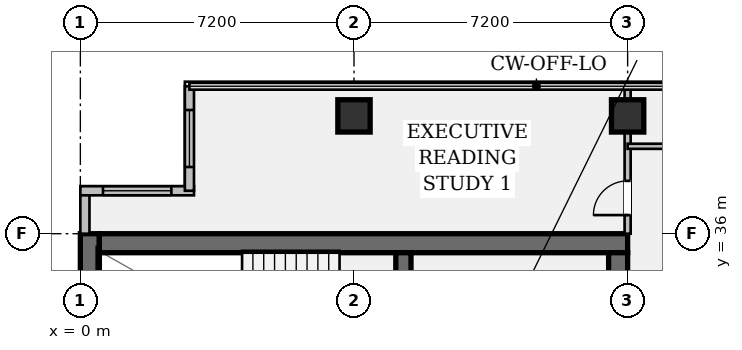
"""IFC4 building model, lengths in metres.
Left out: names, types, materials, properties, quantities, classifications, styles, units other than length and angle.
Written with IfcOpenShell. Run it as: python <this file> out.ifc"""

import sys

from ifc_helpers import new_model, si_unit, direction, frame, frame_2d, origin, origin_2d, place, context, subcontext, project, spatial, rectangle, hollow_rectangle, extrude, element, fill, save


model = new_model("IFC4")
c1 = context("Model", 3, precision=1e-05, world=origin(), true_north=direction((0.0, 1.0)))
c2 = subcontext(c1, "Body", "Model", "MODEL_VIEW")
j1 = project(units=[si_unit("LENGTHUNIT", "METRE"), si_unit("PLANEANGLEUNIT", "RADIAN")], contexts=[c1])
p1 = place(None, origin())
s1 = spatial("IfcSite", under=j1, at=p1, CompositionType="ELEMENT")
p2 = place(p1, origin())
s2 = spatial("IfcBuilding", under=s1, at=p2, CompositionType="ELEMENT")
p3 = place(p2, frame((0.0, 0.0, 183.75)))
s3 = spatial("IfcBuildingStorey", under=s2, at=p3, CompositionType="ELEMENT", Elevation=183.75)
p4 = place(p3, frame((0.25, 7.2, 0.0), z_axis=(0.0, 0.0, 1.0), x_axis=(0.0, 1.0, 0.0)))
e1 = element("IfcWall", 1, at=p4, inside=s3, PredefinedType="SHEAR", context=c2, shape_type="SweptSolid", body=[
    extrude(rectangle(XDim=28.8, YDim=0.5, at=frame_2d((14.4, 0.0))), origin(), (0.0, 0.0, 1.0), 3.24),
])
p5 = place(p3, frame((0.5, 35.75, 0.0), z_axis=(0.0, 0.0, 1.0), x_axis=(1.0, 0.0, 0.0)))
e2 = element("IfcWall", 2, at=p5, inside=s3, PredefinedType="SHEAR", context=c2, shape_type="SweptSolid", body=[
    extrude(rectangle(XDim=13.9, YDim=0.5, at=frame_2d((6.95, 0.0))), origin(), (0.0, 0.0, 1.0), 3.24),
])
p6 = place(p3, frame((14.15, 35.5, 0.0), z_axis=(0.0, 0.0, 1.0), x_axis=(0.0, -1.0, 0.0)))
e3 = element("IfcWall", 3, at=p6, inside=s3, PredefinedType="SHEAR", context=c2, shape_type="SweptSolid", body=[
    extrude(rectangle(XDim=27.8, YDim=0.5, at=frame_2d((13.9, 0.0))), origin(), (0.0, 0.0, 1.0), 3.24),
])
p7 = place(p6, frame((1.4, 0.0, 0.0)))
e4 = element("IfcOpeningElement", 4, at=p7, cuts=e3, PredefinedType="OPENING", context=c2, shape_type="SweptSolid", body=[
    extrude(rectangle(XDim=1.2, YDim=2.15, at=frame_2d((0.6, 1.075))), frame((0.0, 0.262, 0.0), z_axis=(0.0, -1.0, 0.0), x_axis=(1.0, 0.0, 0.0)), (0.0, 0.0, 1.0), 0.524),
])
p8 = place(p6, frame((25.35, 0.0, 0.0)))
e5 = element("IfcOpeningElement", 5, at=p8, cuts=e3, PredefinedType="OPENING", context=c2, shape_type="SweptSolid", body=[
    extrude(rectangle(XDim=1.2, YDim=2.15, at=frame_2d((0.6, 1.075))), frame((0.0, 0.262, 0.0), z_axis=(0.0, -1.0, 0.0), x_axis=(1.0, 0.0, 0.0)), (0.0, 0.0, 1.0), 0.524),
])
p9 = place(p6, frame((14.7, 0.0, 0.0)))
e6 = element("IfcOpeningElement", 6, at=p9, cuts=e3, PredefinedType="OPENING", context=c2, shape_type="SweptSolid", body=[
    extrude(rectangle(XDim=1.6, YDim=2.2, at=frame_2d((0.8, 1.1))), frame((0.0, 0.262, 0.0), z_axis=(0.0, -1.0, 0.0), x_axis=(1.0, 0.0, 0.0)), (0.0, 0.0, 1.0), 0.524),
])
p10 = place(p3, frame((8.5, 31.72, 0.0), z_axis=(0.0, 0.0, 1.0), x_axis=(0.0, 1.0, 0.0)))
e7 = element("IfcWall", 7, at=p10, inside=s3, PredefinedType="SHEAR", context=c2, shape_type="SweptSolid", body=[
    extrude(rectangle(XDim=3.78, YDim=0.4, at=frame_2d((1.89, 0.0))), origin(), (0.0, 0.0, 1.0), 3.24),
])
p11 = place(p10, frame((0.9, 0.0, 0.0)))
e8 = element("IfcOpeningElement", 8, at=p11, cuts=e7, PredefinedType="OPENING", context=c2, shape_type="SweptSolid", body=[
    extrude(rectangle(XDim=1.1, YDim=2.15, at=frame_2d((0.55, 1.075))), frame((0.0, 0.212, 0.0), z_axis=(0.0, -1.0, 0.0), x_axis=(1.0, 0.0, 0.0)), (0.0, 0.0, 1.0), 0.424),
])
for number, where, z_axis, x_axis in (
    (9, (7.2, 39.1, 0.0), (0.0, 0.0, 1.0), (1.0, 0.0, 0.0)),
    (10, (14.4, 39.1, 0.0), (0.0, 0.0, 1.0), (1.0, 0.0, 0.0)),
):
    element("IfcColumn", number, at=place(p3, frame(where, z_axis=z_axis, x_axis=x_axis)), inside=s3, PredefinedType="COLUMN", context=c2, shape_type="SweptSolid", body=[
        extrude(hollow_rectangle(XDim=0.85, YDim=0.85, WallThickness=0.05, at=origin_2d()), origin(), (0.0, 0.0, 1.0), 3.24),
    ])
p12 = place(p3, frame((0.12, 36.0, 0.0), z_axis=(0.0, 0.0, 1.0), x_axis=(0.0, 1.0, 0.0)))
e11 = element("IfcWall", 11, at=p12, inside=s3, PredefinedType="STANDARD", context=c2, shape_type="SweptSolid", body=[
    extrude(rectangle(XDim=1.13, YDim=0.24, at=frame_2d((0.565, 0.0))), origin(), (0.0, 0.0, 1.0), 3.24),
])
p13 = place(p3, frame((0.0, 37.13, 0.0), z_axis=(0.0, 0.0, 1.0), x_axis=(1.0, 0.0, 0.0)))
e12 = element("IfcWall", 12, at=p13, inside=s3, PredefinedType="STANDARD", context=c2, shape_type="SweptSolid", body=[
    extrude(rectangle(XDim=2.99, YDim=0.24, at=frame_2d((1.495, 0.0))), origin(), (0.0, 0.0, 1.0), 3.24),
])
p14 = place(p13, frame((0.595, 0.0, 0.95)))
e13 = element("IfcOpeningElement", 13, at=p14, cuts=e12, PredefinedType="OPENING", context=c2, shape_type="SweptSolid", body=[
    extrude(rectangle(XDim=1.8, YDim=1.35, at=frame_2d((0.9, 0.675))), frame((0.0, 0.132, 0.0), z_axis=(0.0, -1.0, 0.0), x_axis=(1.0, 0.0, 0.0)), (0.0, 0.0, 1.0), 0.264),
])
p15 = place(p3, frame((2.87, 37.13, 0.0), z_axis=(0.0, 0.0, 1.0), x_axis=(0.0, 1.0, 0.0)))
e14 = element("IfcWall", 14, at=p15, inside=s3, PredefinedType="STANDARD", context=c2, shape_type="SweptSolid", body=[
    extrude(rectangle(XDim=2.75, YDim=0.24, at=frame_2d((1.375, 0.0))), origin(), (0.0, 0.0, 1.0), 3.24),
])
p16 = place(p15, frame((0.625, 0.0, 0.95)))
e15 = element("IfcOpeningElement", 15, at=p16, cuts=e14, PredefinedType="OPENING", context=c2, shape_type="SweptSolid", body=[
    extrude(rectangle(XDim=1.5, YDim=1.8, at=frame_2d((0.75, 0.9))), frame((0.0, 0.132, 0.0), z_axis=(0.0, -1.0, 0.0), x_axis=(1.0, 0.0, 0.0)), (0.0, 0.0, 1.0), 0.264),
])
p17 = place(p3, frame((14.4, 36.0, 0.0), z_axis=(0.0, 0.0, 1.0), x_axis=(0.0, 1.0, 0.0)))
e16 = element("IfcWall", 16, at=p17, inside=s3, PredefinedType="PARTITIONING", context=c2, shape_type="SweptSolid", body=[
    extrude(rectangle(XDim=3.88, YDim=0.16, at=frame_2d((1.94, 0.0))), origin(), (0.0, 0.0, 1.0), 2.603),
])
p18 = place(p17, frame((0.49, 0.0, 0.0)))
e17 = element("IfcOpeningElement", 17, at=p18, cuts=e16, PredefinedType="OPENING", context=c2, shape_type="SweptSolid", body=[
    extrude(rectangle(XDim=0.9, YDim=2.15, at=frame_2d((0.45, 1.075))), frame((0.0, 0.092, 0.0), z_axis=(0.0, -1.0, 0.0), x_axis=(1.0, 0.0, 0.0)), (0.0, 0.0, 1.0), 0.184),
])
p19 = place(p3, frame((14.4, 38.3, 0.0), z_axis=(0.0, 0.0, 1.0), x_axis=(1.0, 0.0, 0.0)))
e18 = element("IfcWall", 18, at=p19, inside=s3, PredefinedType="PARTITIONING", context=c2, shape_type="SweptSolid", body=[
    extrude(rectangle(XDim=2.95, YDim=0.135, at=frame_2d((1.475, 0.0))), origin(), (0.0, 0.0, 1.0), 3.24),
])
p20 = place(p19, frame((1.7, 0.0, 0.0)))
e19 = element("IfcOpeningElement", 19, at=p20, cuts=e18, PredefinedType="OPENING", context=c2, shape_type="SweptSolid", body=[
    extrude(rectangle(XDim=0.88, YDim=2.15, at=frame_2d((0.44, 1.075))), frame((0.0, 0.08, 0.0), z_axis=(0.0, -1.0, 0.0), x_axis=(1.0, 0.0, 0.0)), (0.0, 0.0, 1.0), 0.159),
])
p21 = place(p14, origin())
e20 = element("IfcWindow", 20, at=p21, inside=s3, PartitioningType="SINGLE_PANEL", PredefinedType="WINDOW", context=c2, shape_type="SweptSolid", body=[
    extrude(rectangle(XDim=1.8, YDim=1.35, at=frame_2d((0.9, 0.675))), frame((0.0, 0.03, 0.0), z_axis=(0.0, -1.0, 0.0), x_axis=(1.0, 0.0, 0.0)), (0.0, 0.0, 1.0), 0.06),
])
fill(e13, e20)
p22 = place(p16, origin())
e21 = element("IfcWindow", 21, at=p22, inside=s3, PartitioningType="SINGLE_PANEL", PredefinedType="WINDOW", context=c2, shape_type="SweptSolid", body=[
    extrude(rectangle(XDim=1.5, YDim=1.8, at=frame_2d((0.75, 0.9))), frame((0.0, 0.03, 0.0), z_axis=(0.0, -1.0, 0.0), x_axis=(1.0, 0.0, 0.0)), (0.0, 0.0, 1.0), 0.06),
])
fill(e15, e21)
p23 = place(p18, origin())
e22 = element("IfcDoor", 22, at=p23, inside=s3, OperationType="SINGLE_SWING_LEFT", PredefinedType="DOOR", context=c2, shape_type="SweptSolid", body=[
    extrude(rectangle(XDim=0.9, YDim=2.15, at=frame_2d((0.45, 1.075))), frame((0.0, 0.025, 0.0), z_axis=(0.0, -1.0, 0.0), x_axis=(1.0, 0.0, 0.0)), (0.0, 0.0, 1.0), 0.05),
])
fill(e17, e22)
save(model, sys.argv[1])
